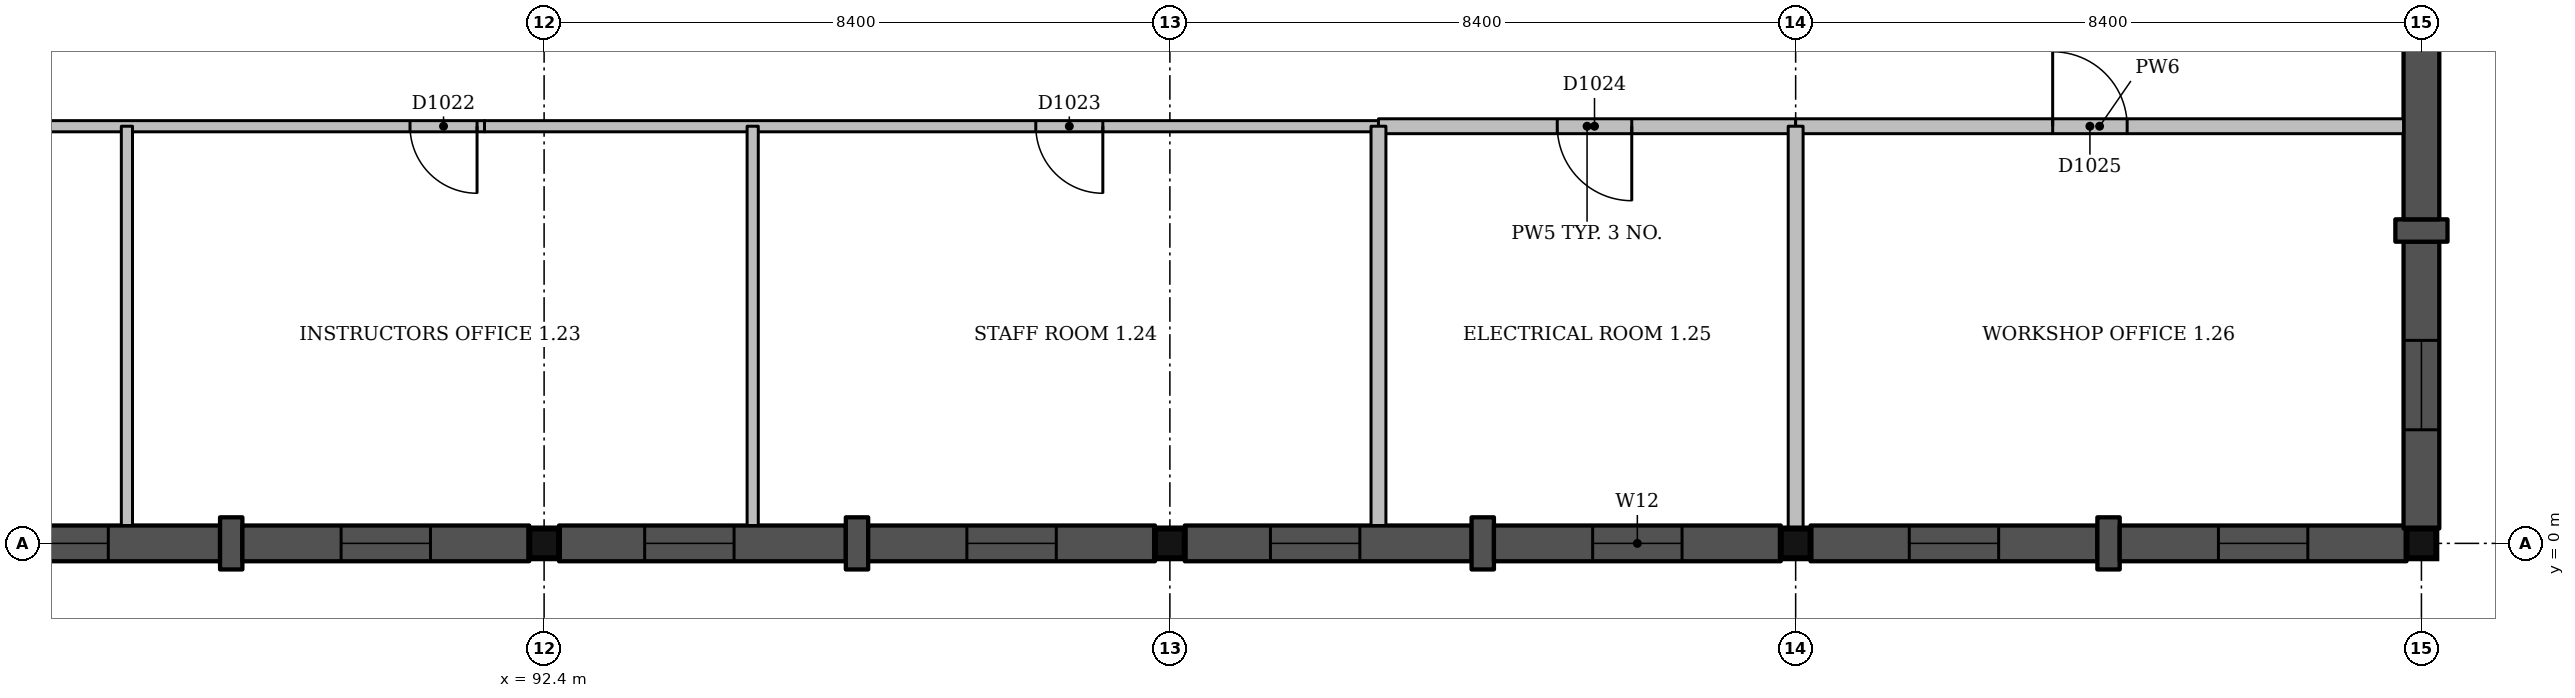
"""IFC4 building model, lengths in metres.
Left out: names, types, materials, properties, quantities, classifications, styles, units other than length and angle.
Written with IfcOpenShell. Run it as: python <this file> out.ifc"""

import sys

from ifc_helpers import new_model, si_unit, direction, frame, frame_2d, origin, origin_2d, place, context, subcontext, project, spatial, rectangle, extrude, element, fill, save


model = new_model("IFC4")
c1 = context("Model", 3, precision=1e-05, world=origin(), true_north=direction((0.0, 1.0)))
c2 = subcontext(c1, "Body", "Model", "MODEL_VIEW")
j1 = project(units=[si_unit("LENGTHUNIT", "METRE"), si_unit("PLANEANGLEUNIT", "RADIAN")], contexts=[c1])
p1 = place(None, origin())
s1 = spatial("IfcSite", under=j1, at=p1, CompositionType="ELEMENT")
p2 = place(p1, origin())
s2 = spatial("IfcBuilding", under=s1, at=p2, CompositionType="ELEMENT")
p3 = place(p2, frame((0.0, 0.0, 4.5)))
s3 = spatial("IfcBuildingStorey", under=s2, at=p3, CompositionType="ELEMENT", Elevation=4.5)
for number, where, z_axis, x_axis in (
    (1, (92.4, 0.0, 0.0), (0.0, 0.0, 1.0), (1.0, 0.0, 0.0)),
    (2, (100.8, 0.0, 0.0), (0.0, 0.0, 1.0), (1.0, 0.0, 0.0)),
    (3, (109.2, 0.0, 0.0), (0.0, 0.0, 1.0), (1.0, 0.0, 0.0)),
    (4, (117.6, 0.0, 0.0), (0.0, 0.0, 1.0), (1.0, 0.0, 0.0)),
):
    element("IfcColumn", number, at=place(p3, frame(where, z_axis=z_axis, x_axis=x_axis)), inside=s3, PredefinedType="COLUMN", context=c2, shape_type="SweptSolid", body=[
        extrude(rectangle(XDim=0.4, YDim=0.4, at=origin_2d()), origin(), (0.0, 0.0, 1.0), 4.5),
    ])
p4 = place(p3, frame((84.2, 0.0, 0.0), z_axis=(0.0, 0.0, 1.0), x_axis=(1.0, 0.0, 0.0)))
e5 = element("IfcWall", 5, at=p4, inside=s3, PredefinedType="SOLIDWALL", context=c2, shape_type="SweptSolid", body=[
    extrude(rectangle(XDim=3.85, YDim=0.48, at=frame_2d((1.925, 0.0))), origin(), (0.0, 0.0, 1.0), 3.45),
])
p5 = place(p4, frame((1.15, 0.0, 0.9)))
e6 = element("IfcOpeningElement", 6, at=p5, cuts=e5, PredefinedType="OPENING", context=c2, shape_type="SweptSolid", body=[
    extrude(rectangle(XDim=1.2, YDim=2.1, at=frame_2d((0.6, 1.05))), frame((0.0, 0.25, 0.0), z_axis=(0.0, -1.0, 0.0), x_axis=(1.0, 0.0, 0.0)), (0.0, 0.0, 1.0), 0.5),
])
p6 = place(p3, frame((88.05, 0.0, 0.0), z_axis=(0.0, 0.0, 1.0), x_axis=(1.0, 0.0, 0.0)))
e7 = element("IfcWall", 7, at=p6, inside=s3, PredefinedType="SOLIDWALL", context=c2, shape_type="SweptSolid", body=[
    extrude(rectangle(XDim=0.3, YDim=0.7, at=frame_2d((0.15, 0.0))), origin(), (0.0, 0.0, 1.0), 3.45),
])
p7 = place(p3, frame((88.35, 0.0, 0.0), z_axis=(0.0, 0.0, 1.0), x_axis=(1.0, 0.0, 0.0)))
e8 = element("IfcWall", 8, at=p7, inside=s3, PredefinedType="SOLIDWALL", context=c2, shape_type="SweptSolid", body=[
    extrude(rectangle(XDim=3.85, YDim=0.48, at=frame_2d((1.925, 0.0))), origin(), (0.0, 0.0, 1.0), 3.45),
])
p8 = place(p7, frame((1.325, 0.0, 0.9)))
e9 = element("IfcOpeningElement", 9, at=p8, cuts=e8, PredefinedType="OPENING", context=c2, shape_type="SweptSolid", body=[
    extrude(rectangle(XDim=1.2, YDim=2.1, at=frame_2d((0.6, 1.05))), frame((0.0, 0.25, 0.0), z_axis=(0.0, -1.0, 0.0), x_axis=(1.0, 0.0, 0.0)), (0.0, 0.0, 1.0), 0.5),
])
p9 = place(p3, frame((92.6, 0.0, 0.0), z_axis=(0.0, 0.0, 1.0), x_axis=(1.0, 0.0, 0.0)))
e10 = element("IfcWall", 10, at=p9, inside=s3, PredefinedType="SOLIDWALL", context=c2, shape_type="SweptSolid", body=[
    extrude(rectangle(XDim=3.85, YDim=0.48, at=frame_2d((1.925, 0.0))), origin(), (0.0, 0.0, 1.0), 3.45),
])
p10 = place(p9, frame((1.15, 0.0, 0.9)))
e11 = element("IfcOpeningElement", 11, at=p10, cuts=e10, PredefinedType="OPENING", context=c2, shape_type="SweptSolid", body=[
    extrude(rectangle(XDim=1.2, YDim=2.1, at=frame_2d((0.6, 1.05))), frame((0.0, 0.25, 0.0), z_axis=(0.0, -1.0, 0.0), x_axis=(1.0, 0.0, 0.0)), (0.0, 0.0, 1.0), 0.5),
])
p11 = place(p3, frame((96.45, 0.0, 0.0), z_axis=(0.0, 0.0, 1.0), x_axis=(1.0, 0.0, 0.0)))
e12 = element("IfcWall", 12, at=p11, inside=s3, PredefinedType="SOLIDWALL", context=c2, shape_type="SweptSolid", body=[
    extrude(rectangle(XDim=0.3, YDim=0.7, at=frame_2d((0.15, 0.0))), origin(), (0.0, 0.0, 1.0), 3.45),
])
p12 = place(p3, frame((96.75, 0.0, 0.0), z_axis=(0.0, 0.0, 1.0), x_axis=(1.0, 0.0, 0.0)))
e13 = element("IfcWall", 13, at=p12, inside=s3, PredefinedType="SOLIDWALL", context=c2, shape_type="SweptSolid", body=[
    extrude(rectangle(XDim=3.85, YDim=0.48, at=frame_2d((1.925, 0.0))), origin(), (0.0, 0.0, 1.0), 3.45),
])
p13 = place(p12, frame((1.325, 0.0, 0.9)))
e14 = element("IfcOpeningElement", 14, at=p13, cuts=e13, PredefinedType="OPENING", context=c2, shape_type="SweptSolid", body=[
    extrude(rectangle(XDim=1.2, YDim=2.1, at=frame_2d((0.6, 1.05))), frame((0.0, 0.25, 0.0), z_axis=(0.0, -1.0, 0.0), x_axis=(1.0, 0.0, 0.0)), (0.0, 0.0, 1.0), 0.5),
])
p14 = place(p3, frame((101.0, 0.0, 0.0), z_axis=(0.0, 0.0, 1.0), x_axis=(1.0, 0.0, 0.0)))
e15 = element("IfcWall", 15, at=p14, inside=s3, PredefinedType="SOLIDWALL", context=c2, shape_type="SweptSolid", body=[
    extrude(rectangle(XDim=3.85, YDim=0.48, at=frame_2d((1.925, 0.0))), origin(), (0.0, 0.0, 1.0), 3.45),
])
p15 = place(p14, frame((1.15, 0.0, 0.9)))
e16 = element("IfcOpeningElement", 16, at=p15, cuts=e15, PredefinedType="OPENING", context=c2, shape_type="SweptSolid", body=[
    extrude(rectangle(XDim=1.2, YDim=2.1, at=frame_2d((0.6, 1.05))), frame((0.0, 0.25, 0.0), z_axis=(0.0, -1.0, 0.0), x_axis=(1.0, 0.0, 0.0)), (0.0, 0.0, 1.0), 0.5),
])
p16 = place(p3, frame((104.85, 0.0, 0.0), z_axis=(0.0, 0.0, 1.0), x_axis=(1.0, 0.0, 0.0)))
e17 = element("IfcWall", 17, at=p16, inside=s3, PredefinedType="SOLIDWALL", context=c2, shape_type="SweptSolid", body=[
    extrude(rectangle(XDim=0.3, YDim=0.7, at=frame_2d((0.15, 0.0))), origin(), (0.0, 0.0, 1.0), 3.45),
])
p17 = place(p3, frame((105.15, 0.0, 0.0), z_axis=(0.0, 0.0, 1.0), x_axis=(1.0, 0.0, 0.0)))
e18 = element("IfcWall", 18, at=p17, inside=s3, PredefinedType="SOLIDWALL", context=c2, shape_type="SweptSolid", body=[
    extrude(rectangle(XDim=3.85, YDim=0.48, at=frame_2d((1.925, 0.0))), origin(), (0.0, 0.0, 1.0), 3.45),
])
p18 = place(p17, frame((1.325, 0.0, 2.4)))
e19 = element("IfcOpeningElement", 19, at=p18, cuts=e18, PredefinedType="OPENING", context=c2, shape_type="SweptSolid", body=[
    extrude(rectangle(XDim=1.2, YDim=0.6, at=frame_2d((0.6, 0.3))), frame((0.0, 0.25, 0.0), z_axis=(0.0, -1.0, 0.0), x_axis=(1.0, 0.0, 0.0)), (0.0, 0.0, 1.0), 0.5),
])
p19 = place(p3, frame((109.4, 0.0, 0.0), z_axis=(0.0, 0.0, 1.0), x_axis=(1.0, 0.0, 0.0)))
e20 = element("IfcWall", 20, at=p19, inside=s3, PredefinedType="SOLIDWALL", context=c2, shape_type="SweptSolid", body=[
    extrude(rectangle(XDim=3.85, YDim=0.48, at=frame_2d((1.925, 0.0))), origin(), (0.0, 0.0, 1.0), 3.45),
])
p20 = place(p19, frame((1.325, 0.0, 0.9)))
e21 = element("IfcOpeningElement", 21, at=p20, cuts=e20, PredefinedType="OPENING", context=c2, shape_type="SweptSolid", body=[
    extrude(rectangle(XDim=1.2, YDim=2.1, at=frame_2d((0.6, 1.05))), frame((0.0, 0.25, 0.0), z_axis=(0.0, -1.0, 0.0), x_axis=(1.0, 0.0, 0.0)), (0.0, 0.0, 1.0), 0.5),
])
p21 = place(p3, frame((113.25, 0.0, 0.0), z_axis=(0.0, 0.0, 1.0), x_axis=(1.0, 0.0, 0.0)))
e22 = element("IfcWall", 22, at=p21, inside=s3, PredefinedType="SOLIDWALL", context=c2, shape_type="SweptSolid", body=[
    extrude(rectangle(XDim=0.3, YDim=0.7, at=frame_2d((0.15, 0.0))), origin(), (0.0, 0.0, 1.0), 3.45),
])
p22 = place(p3, frame((113.55, 0.0, 0.0), z_axis=(0.0, 0.0, 1.0), x_axis=(1.0, 0.0, 0.0)))
e23 = element("IfcWall", 23, at=p22, inside=s3, PredefinedType="SOLIDWALL", context=c2, shape_type="SweptSolid", body=[
    extrude(rectangle(XDim=3.85, YDim=0.48, at=frame_2d((1.925, 0.0))), origin(), (0.0, 0.0, 1.0), 3.45),
])
p23 = place(p22, frame((1.325, 0.0, 0.9)))
e24 = element("IfcOpeningElement", 24, at=p23, cuts=e23, PredefinedType="OPENING", context=c2, shape_type="SweptSolid", body=[
    extrude(rectangle(XDim=1.2, YDim=2.1, at=frame_2d((0.6, 1.05))), frame((0.0, 0.25, 0.0), z_axis=(0.0, -1.0, 0.0), x_axis=(1.0, 0.0, 0.0)), (0.0, 0.0, 1.0), 0.5),
])
p24 = place(p3, frame((117.6, 0.2, 0.0), z_axis=(0.0, 0.0, 1.0), x_axis=(0.0, 1.0, 0.0)))
e25 = element("IfcWall", 25, at=p24, inside=s3, PredefinedType="SOLIDWALL", context=c2, shape_type="SweptSolid", body=[
    extrude(rectangle(XDim=3.85, YDim=0.48, at=frame_2d((1.925, 0.0))), origin(), (0.0, 0.0, 1.0), 3.45),
])
p25 = place(p24, frame((1.325, 0.0, 0.9)))
e26 = element("IfcOpeningElement", 26, at=p25, cuts=e25, PredefinedType="OPENING", context=c2, shape_type="SweptSolid", body=[
    extrude(rectangle(XDim=1.2, YDim=2.1, at=frame_2d((0.6, 1.05))), frame((0.0, 0.25, 0.0), z_axis=(0.0, -1.0, 0.0), x_axis=(1.0, 0.0, 0.0)), (0.0, 0.0, 1.0), 0.5),
])
p26 = place(p3, frame((117.6, 4.05, 0.0), z_axis=(0.0, 0.0, 1.0), x_axis=(0.0, 1.0, 0.0)))
e27 = element("IfcWall", 27, at=p26, inside=s3, PredefinedType="SOLIDWALL", context=c2, shape_type="SweptSolid", body=[
    extrude(rectangle(XDim=0.3, YDim=0.7, at=frame_2d((0.15, 0.0))), origin(), (0.0, 0.0, 1.0), 3.45),
])
p27 = place(p3, frame((117.6, 4.35, 0.0), z_axis=(0.0, 0.0, 1.0), x_axis=(0.0, 1.0, 0.0)))
e28 = element("IfcWall", 28, at=p27, inside=s3, PredefinedType="SOLIDWALL", context=c2, shape_type="SweptSolid", body=[
    extrude(rectangle(XDim=3.85, YDim=0.48, at=frame_2d((1.925, 0.0))), origin(), (0.0, 0.0, 1.0), 3.45),
])
p28 = place(p3, frame((61.6, 5.6, 0.0), z_axis=(0.0, 0.0, 1.0), x_axis=(1.0, 0.0, 0.0)))
e29 = element("IfcWall", 29, at=p28, inside=s3, PredefinedType="PARTITIONING", context=c2, shape_type="SweptSolid", body=[
    extrude(rectangle(XDim=30.0, YDim=0.15, at=frame_2d((15.0, 0.0))), origin(), (0.0, 0.0, 1.0), 3.5),
])
p29 = place(p28, frame((8.0, 0.0, 0.0)))
e30 = element("IfcOpeningElement", 30, at=p29, cuts=e29, PredefinedType="OPENING", context=c2, shape_type="SweptSolid", body=[
    extrude(rectangle(XDim=0.9, YDim=2.1, at=frame_2d((0.45, 1.05))), frame((0.0, 0.085, 0.0), z_axis=(0.0, -1.0, 0.0), x_axis=(1.0, 0.0, 0.0)), (0.0, 0.0, 1.0), 0.17),
])
p30 = place(p28, frame((20.6, 0.0, 0.0)))
e31 = element("IfcOpeningElement", 31, at=p30, cuts=e29, PredefinedType="OPENING", context=c2, shape_type="SweptSolid", body=[
    extrude(rectangle(XDim=0.9, YDim=2.1, at=frame_2d((0.45, 1.05))), frame((0.0, 0.085, 0.0), z_axis=(0.0, -1.0, 0.0), x_axis=(1.0, 0.0, 0.0)), (0.0, 0.0, 1.0), 0.17),
])
p31 = place(p28, frame((29.0, 0.0, 0.0)))
e32 = element("IfcOpeningElement", 32, at=p31, cuts=e29, PredefinedType="OPENING", context=c2, shape_type="SweptSolid", body=[
    extrude(rectangle(XDim=0.9, YDim=2.1, at=frame_2d((0.45, 1.05))), frame((0.0, 0.085, 0.0), z_axis=(0.0, -1.0, 0.0), x_axis=(1.0, 0.0, 0.0)), (0.0, 0.0, 1.0), 0.17),
])
p32 = place(p3, frame((91.6, 5.6, 0.0), z_axis=(0.0, 0.0, 1.0), x_axis=(1.0, 0.0, 0.0)))
e33 = element("IfcWall", 33, at=p32, inside=s3, PredefinedType="PARTITIONING", context=c2, shape_type="SweptSolid", body=[
    extrude(rectangle(XDim=12.0, YDim=0.15, at=frame_2d((6.0, 0.0))), origin(), (0.0, 0.0, 1.0), 3.5),
])
p33 = place(p32, frame((7.4, 0.0, 0.0)))
e34 = element("IfcOpeningElement", 34, at=p33, cuts=e33, PredefinedType="OPENING", context=c2, shape_type="SweptSolid", body=[
    extrude(rectangle(XDim=0.9, YDim=2.1, at=frame_2d((0.45, 1.05))), frame((0.0, 0.085, 0.0), z_axis=(0.0, -1.0, 0.0), x_axis=(1.0, 0.0, 0.0)), (0.0, 0.0, 1.0), 0.17),
])
p34 = place(p3, frame((103.6, 5.6, 0.0), z_axis=(0.0, 0.0, 1.0), x_axis=(1.0, 0.0, 0.0)))
e35 = element("IfcWall", 35, at=p34, inside=s3, PredefinedType="PARTITIONING", context=c2, shape_type="SweptSolid", body=[
    extrude(rectangle(XDim=5.6, YDim=0.2, at=frame_2d((2.8, 0.0))), origin(), (0.0, 0.0, 1.0), 3.5),
])
p35 = place(p34, frame((2.4, 0.0, 0.0)))
e36 = element("IfcOpeningElement", 36, at=p35, cuts=e35, PredefinedType="OPENING", context=c2, shape_type="SweptSolid", body=[
    extrude(rectangle(XDim=1.0, YDim=2.1, at=frame_2d((0.5, 1.05))), frame((0.0, 0.11, 0.0), z_axis=(0.0, -1.0, 0.0), x_axis=(1.0, 0.0, 0.0)), (0.0, 0.0, 1.0), 0.22),
])
p36 = place(p3, frame((109.2, 5.6, 0.0), z_axis=(0.0, 0.0, 1.0), x_axis=(1.0, 0.0, 0.0)))
e37 = element("IfcWall", 37, at=p36, inside=s3, PredefinedType="PARTITIONING", context=c2, shape_type="SweptSolid", body=[
    extrude(rectangle(XDim=8.16, YDim=0.2, at=frame_2d((4.08, 0.0))), origin(), (0.0, 0.0, 1.0), 3.5),
])
p37 = place(p36, frame((3.45, 0.0, 0.0)))
e38 = element("IfcOpeningElement", 38, at=p37, cuts=e37, PredefinedType="OPENING", context=c2, shape_type="SweptSolid", body=[
    extrude(rectangle(XDim=1.0, YDim=2.1, at=frame_2d((0.5, 1.05))), frame((0.0, 0.11, 0.0), z_axis=(0.0, -1.0, 0.0), x_axis=(1.0, 0.0, 0.0)), (0.0, 0.0, 1.0), 0.22),
])
for number, where, z_axis, x_axis in (
    (39, (86.8, 0.24, 0.0), (0.0, 0.0, 1.0), (0.0, 1.0, 0.0)),
    (40, (95.2, 0.24, 0.0), (0.0, 0.0, 1.0), (0.0, 1.0, 0.0)),
):
    element("IfcWall", number, at=place(p3, frame(where, z_axis=z_axis, x_axis=x_axis)), inside=s3, PredefinedType="PARTITIONING", context=c2, shape_type="SweptSolid", body=[
        extrude(rectangle(XDim=5.36, YDim=0.15, at=frame_2d((2.68, 0.0))), origin(), (0.0, 0.0, 1.0), 4.15),
    ])
p38 = place(p3, frame((103.6, 0.24, 0.0), z_axis=(0.0, 0.0, 1.0), x_axis=(0.0, 1.0, 0.0)))
e41 = element("IfcWall", 41, at=p38, inside=s3, PredefinedType="PARTITIONING", context=c2, shape_type="SweptSolid", body=[
    extrude(rectangle(XDim=5.36, YDim=0.2, at=frame_2d((2.68, 0.0))), origin(), (0.0, 0.0, 1.0), 4.15),
])
p39 = place(p3, frame((109.2, 0.2, 0.0), z_axis=(0.0, 0.0, 1.0), x_axis=(0.0, 1.0, 0.0)))
e42 = element("IfcWall", 42, at=p39, inside=s3, PredefinedType="PARTITIONING", context=c2, shape_type="SweptSolid", body=[
    extrude(rectangle(XDim=5.4, YDim=0.2, at=frame_2d((2.7, 0.0))), origin(), (0.0, 0.0, 1.0), 3.5),
])
p40 = place(p5, origin())
e43 = element("IfcWindow", 43, at=p40, inside=s3, PartitioningType="SINGLE_PANEL", PredefinedType="WINDOW", context=c2, shape_type="SweptSolid", body=[
    extrude(rectangle(XDim=1.2, YDim=2.1, at=frame_2d((0.6, 1.05))), frame((0.0, 0.12, 0.0), z_axis=(0.0, -1.0, 0.0), x_axis=(1.0, 0.0, 0.0)), (0.0, 0.0, 1.0), 0.06),
])
fill(e6, e43)
p41 = place(p8, origin())
e44 = element("IfcWindow", 44, at=p41, inside=s3, PartitioningType="SINGLE_PANEL", PredefinedType="WINDOW", context=c2, shape_type="SweptSolid", body=[
    extrude(rectangle(XDim=1.2, YDim=2.1, at=frame_2d((0.6, 1.05))), frame((0.0, 0.12, 0.0), z_axis=(0.0, -1.0, 0.0), x_axis=(1.0, 0.0, 0.0)), (0.0, 0.0, 1.0), 0.06),
])
fill(e9, e44)
p42 = place(p10, origin())
e45 = element("IfcWindow", 45, at=p42, inside=s3, PartitioningType="SINGLE_PANEL", PredefinedType="WINDOW", context=c2, shape_type="SweptSolid", body=[
    extrude(rectangle(XDim=1.2, YDim=2.1, at=frame_2d((0.6, 1.05))), frame((0.0, 0.12, 0.0), z_axis=(0.0, -1.0, 0.0), x_axis=(1.0, 0.0, 0.0)), (0.0, 0.0, 1.0), 0.06),
])
fill(e11, e45)
p43 = place(p13, origin())
e46 = element("IfcWindow", 46, at=p43, inside=s3, PartitioningType="SINGLE_PANEL", PredefinedType="WINDOW", context=c2, shape_type="SweptSolid", body=[
    extrude(rectangle(XDim=1.2, YDim=2.1, at=frame_2d((0.6, 1.05))), frame((0.0, 0.12, 0.0), z_axis=(0.0, -1.0, 0.0), x_axis=(1.0, 0.0, 0.0)), (0.0, 0.0, 1.0), 0.06),
])
fill(e14, e46)
p44 = place(p15, origin())
e47 = element("IfcWindow", 47, at=p44, inside=s3, PartitioningType="SINGLE_PANEL", PredefinedType="WINDOW", context=c2, shape_type="SweptSolid", body=[
    extrude(rectangle(XDim=1.2, YDim=2.1, at=frame_2d((0.6, 1.05))), frame((0.0, 0.12, 0.0), z_axis=(0.0, -1.0, 0.0), x_axis=(1.0, 0.0, 0.0)), (0.0, 0.0, 1.0), 0.06),
])
fill(e16, e47)
p45 = place(p18, origin())
e48 = element("IfcWindow", 48, at=p45, inside=s3, PartitioningType="SINGLE_PANEL", PredefinedType="WINDOW", context=c2, shape_type="SweptSolid", body=[
    extrude(rectangle(XDim=1.2, YDim=0.6, at=frame_2d((0.6, 0.3))), frame((0.0, 0.12, 0.0), z_axis=(0.0, -1.0, 0.0), x_axis=(1.0, 0.0, 0.0)), (0.0, 0.0, 1.0), 0.06),
])
fill(e19, e48)
p46 = place(p20, origin())
e49 = element("IfcWindow", 49, at=p46, inside=s3, PartitioningType="SINGLE_PANEL", PredefinedType="WINDOW", context=c2, shape_type="SweptSolid", body=[
    extrude(rectangle(XDim=1.2, YDim=2.1, at=frame_2d((0.6, 1.05))), frame((0.0, 0.12, 0.0), z_axis=(0.0, -1.0, 0.0), x_axis=(1.0, 0.0, 0.0)), (0.0, 0.0, 1.0), 0.06),
])
fill(e21, e49)
p47 = place(p23, origin())
e50 = element("IfcWindow", 50, at=p47, inside=s3, PartitioningType="SINGLE_PANEL", PredefinedType="WINDOW", context=c2, shape_type="SweptSolid", body=[
    extrude(rectangle(XDim=1.2, YDim=2.1, at=frame_2d((0.6, 1.05))), frame((0.0, 0.12, 0.0), z_axis=(0.0, -1.0, 0.0), x_axis=(1.0, 0.0, 0.0)), (0.0, 0.0, 1.0), 0.06),
])
fill(e24, e50)
p48 = place(p25, origin())
e51 = element("IfcWindow", 51, at=p48, inside=s3, PartitioningType="SINGLE_PANEL", PredefinedType="WINDOW", context=c2, shape_type="SweptSolid", body=[
    extrude(rectangle(XDim=1.2, YDim=2.1, at=frame_2d((0.6, 1.05))), frame((0.0, 0.12, 0.0), z_axis=(0.0, -1.0, 0.0), x_axis=(1.0, 0.0, 0.0)), (0.0, 0.0, 1.0), 0.06),
])
fill(e26, e51)
p49 = place(p31, origin())
e52 = element("IfcDoor", 52, at=p49, inside=s3, OperationType="SINGLE_SWING_RIGHT", PredefinedType="DOOR", context=c2, shape_type="SweptSolid", body=[
    extrude(rectangle(XDim=0.9, YDim=2.1, at=frame_2d((0.45, 1.05))), frame((0.0, 0.025, 0.0), z_axis=(0.0, -1.0, 0.0), x_axis=(1.0, 0.0, 0.0)), (0.0, 0.0, 1.0), 0.05),
])
fill(e32, e52)
p50 = place(p33, origin())
e53 = element("IfcDoor", 53, at=p50, inside=s3, OperationType="SINGLE_SWING_RIGHT", PredefinedType="DOOR", context=c2, shape_type="SweptSolid", body=[
    extrude(rectangle(XDim=0.9, YDim=2.1, at=frame_2d((0.45, 1.05))), frame((0.0, 0.025, 0.0), z_axis=(0.0, -1.0, 0.0), x_axis=(1.0, 0.0, 0.0)), (0.0, 0.0, 1.0), 0.05),
])
fill(e34, e53)
p51 = place(p35, origin())
e54 = element("IfcDoor", 54, at=p51, inside=s3, OperationType="SINGLE_SWING_RIGHT", PredefinedType="DOOR", context=c2, shape_type="SweptSolid", body=[
    extrude(rectangle(XDim=1.0, YDim=2.1, at=frame_2d((0.5, 1.05))), frame((0.0, 0.025, 0.0), z_axis=(0.0, -1.0, 0.0), x_axis=(1.0, 0.0, 0.0)), (0.0, 0.0, 1.0), 0.05),
])
fill(e36, e54)
p52 = place(p37, origin())
e55 = element("IfcDoor", 55, at=p52, inside=s3, OperationType="SINGLE_SWING_LEFT", PredefinedType="DOOR", context=c2, shape_type="SweptSolid", body=[
    extrude(rectangle(XDim=1.0, YDim=2.1, at=frame_2d((0.5, 1.05))), frame((0.0, 0.025, 0.0), z_axis=(0.0, -1.0, 0.0), x_axis=(1.0, 0.0, 0.0)), (0.0, 0.0, 1.0), 0.05),
])
fill(e38, e55)
save(model, sys.argv[1])
